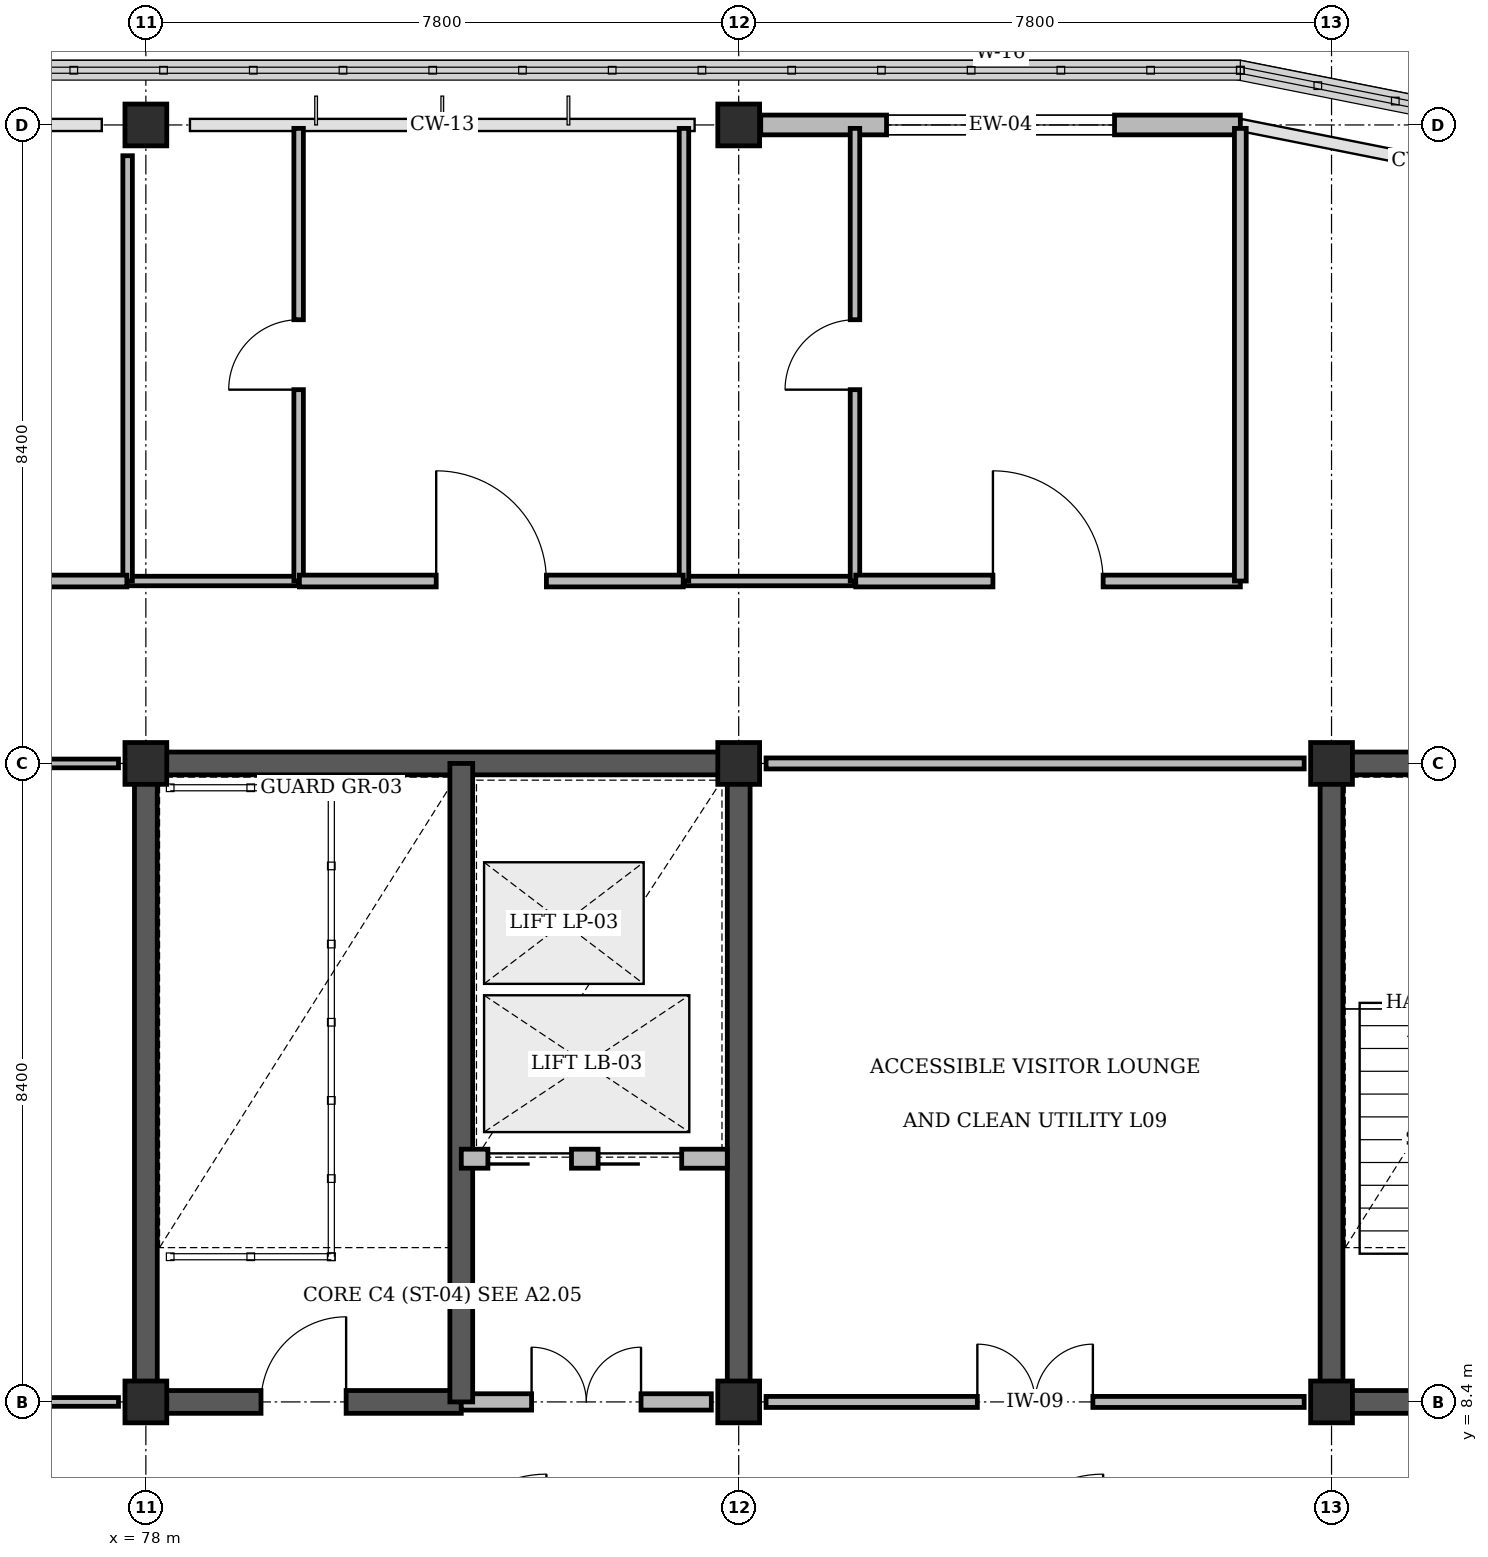
"""IFC4 building model, lengths in metres.
Left out: names, types, materials, properties, quantities, classifications, styles, units other than length and angle.
Written with IfcOpenShell. Run it as: python <this file> out.ifc"""

import sys

from ifc_helpers import new_model, si_unit, direction, frame, frame_2d, origin, origin_2d, place, context, subcontext, project, spatial, rectangle, extrude, element, fill, save


model = new_model("IFC4")
c1 = context("Model", 3, precision=1e-05, world=origin(), true_north=direction((0.0, 1.0)))
c2 = subcontext(c1, "Body", "Model", "MODEL_VIEW")
j1 = project(units=[si_unit("LENGTHUNIT", "METRE"), si_unit("PLANEANGLEUNIT", "RADIAN")], contexts=[c1])
p1 = place(None, origin())
s1 = spatial("IfcSite", under=j1, at=p1, CompositionType="ELEMENT")
p2 = place(p1, origin())
s2 = spatial("IfcBuilding", under=s1, at=p2, CompositionType="ELEMENT")
p3 = place(p2, frame((0.0, 0.0, 39.0)))
s3 = spatial("IfcBuildingStorey", under=s2, at=p3, CompositionType="ELEMENT", Elevation=39.0)
p4 = place(p3, frame((77.85, 16.8, 0.0), z_axis=(0.0, 0.0, 1.0), x_axis=(1.0, 0.0, 0.0)))
e1 = element("IfcWall", 1, at=p4, inside=s3, PredefinedType="SHEAR", context=c2, shape_type="SweptSolid", body=[
    extrude(rectangle(XDim=8.1, YDim=0.3, at=frame_2d((4.05, 0.0))), origin(), (0.0, 0.0, 1.0), 4.2),
])
for number, where, z_axis, x_axis in (
    (2, (78.0, 8.4, 0.0), (0.0, 0.0, 1.0), (0.0, 1.0, 0.0)),
    (3, (85.8, 8.4, 0.0), (0.0, 0.0, 1.0), (0.0, 1.0, 0.0)),
):
    element("IfcWall", number, at=place(p3, frame(where, z_axis=z_axis, x_axis=x_axis)), inside=s3, PredefinedType="SHEAR", context=c2, shape_type="SweptSolid", body=[
        extrude(rectangle(XDim=8.4, YDim=0.3, at=frame_2d((4.2, 0.0))), origin(), (0.0, 0.0, 1.0), 4.2),
    ])
p5 = place(p3, frame((93.45, 16.8, 0.0), z_axis=(0.0, 0.0, 1.0), x_axis=(1.0, 0.0, 0.0)))
e4 = element("IfcWall", 4, at=p5, inside=s3, PredefinedType="SHEAR", context=c2, shape_type="SweptSolid", body=[
    extrude(rectangle(XDim=8.1, YDim=0.3, at=frame_2d((4.05, 0.0))), origin(), (0.0, 0.0, 1.0), 3.92),
])
p6 = place(p3, frame((93.6, 8.4, 0.0), z_axis=(0.0, 0.0, 1.0), x_axis=(0.0, 1.0, 0.0)))
e5 = element("IfcWall", 5, at=p6, inside=s3, PredefinedType="SHEAR", context=c2, shape_type="SweptSolid", body=[
    extrude(rectangle(XDim=8.4, YDim=0.3, at=frame_2d((4.2, 0.0))), origin(), (0.0, 0.0, 1.0), 3.92),
])
for number, where, z_axis, x_axis in (
    (6, (78.0, 8.4, 0.0), (0.0, 0.0, 1.0), (1.0, 0.0, 0.0)),
    (7, (78.0, 16.8, 0.0), (0.0, 0.0, 1.0), (1.0, 0.0, 0.0)),
    (8, (78.0, 25.2, 0.0), (0.0, 0.0, 1.0), (1.0, 0.0, 0.0)),
    (9, (85.8, 8.4, 0.0), (0.0, 0.0, 1.0), (1.0, 0.0, 0.0)),
    (10, (85.8, 16.8, 0.0), (0.0, 0.0, 1.0), (1.0, 0.0, 0.0)),
    (11, (85.8, 25.2, 0.0), (0.0, 0.0, 1.0), (1.0, 0.0, 0.0)),
    (12, (93.6, 8.4, 0.0), (0.0, 0.0, 1.0), (1.0, 0.0, 0.0)),
    (13, (93.6, 16.8, 0.0), (0.0, 0.0, 1.0), (1.0, 0.0, 0.0)),
):
    element("IfcColumn", number, at=place(p3, frame(where, z_axis=z_axis, x_axis=x_axis)), inside=s3, PredefinedType="COLUMN", context=c2, shape_type="SweptSolid", body=[
        extrude(rectangle(XDim=0.55, YDim=0.55, at=origin_2d()), origin(), (0.0, 0.0, 1.0), 4.2),
    ])
p7 = place(p3, frame((86.09, 25.2, 0.0), z_axis=(0.0, 0.0, 1.0), x_axis=(1.0, 0.0, 0.0)))
e14 = element("IfcWall", 14, at=p7, inside=s3, PredefinedType="STANDARD", context=c2, shape_type="SweptSolid", body=[
    extrude(rectangle(XDim=6.31, YDim=0.26, at=frame_2d((3.155, 0.0))), origin(), (0.0, 0.0, 1.0), 3.9),
])
p8 = place(p7, frame((1.655, 0.0, 0.85)))
e15 = element("IfcOpeningElement", 15, at=p8, cuts=e14, PredefinedType="OPENING", context=c2, shape_type="SweptSolid", body=[
    extrude(rectangle(XDim=3.0, YDim=1.8, at=frame_2d((1.5, 0.9))), frame((0.0, 0.14, 0.0), z_axis=(0.0, -1.0, 0.0), x_axis=(1.0, 0.0, 0.0)), (0.0, 0.0, 1.0), 0.28),
])
p9 = place(p3, frame((78.0, 8.4, 0.0), z_axis=(0.0, 0.0, 1.0), x_axis=(1.0, 0.0, 0.0)))
e16 = element("IfcWall", 16, at=p9, inside=s3, PredefinedType="SHEAR", context=c2, shape_type="SweptSolid", body=[
    extrude(rectangle(XDim=4.15, YDim=0.3, at=frame_2d((2.075, 0.0))), origin(), (0.0, 0.0, 1.0), 4.2),
])
p10 = place(p9, frame((1.515, 0.0, 0.0)))
e17 = element("IfcOpeningElement", 17, at=p10, cuts=e16, PredefinedType="OPENING", context=c2, shape_type="SweptSolid", body=[
    extrude(rectangle(XDim=1.12, YDim=2.15, at=frame_2d((0.56, 1.075))), frame((0.0, 0.16, 0.0), z_axis=(0.0, -1.0, 0.0), x_axis=(1.0, 0.0, 0.0)), (0.0, 0.0, 1.0), 0.32),
])
p11 = place(p3, frame((82.15, 8.4, 0.0), z_axis=(0.0, 0.0, 1.0), x_axis=(1.0, 0.0, 0.0)))
e18 = element("IfcWall", 18, at=p11, inside=s3, PredefinedType="STANDARD", context=c2, shape_type="SweptSolid", body=[
    extrude(rectangle(XDim=3.29, YDim=0.215, at=frame_2d((1.645, 0.0))), origin(), (0.0, 0.0, 1.0), 3.37),
])
p12 = place(p11, frame((0.925, 0.0, 0.0)))
e19 = element("IfcOpeningElement", 19, at=p12, cuts=e18, PredefinedType="OPENING", context=c2, shape_type="SweptSolid", body=[
    extrude(rectangle(XDim=1.44, YDim=2.2, at=frame_2d((0.72, 1.1))), frame((0.0, 0.118, 0.0), z_axis=(0.0, -1.0, 0.0), x_axis=(1.0, 0.0, 0.0)), (0.0, 0.0, 1.0), 0.235),
])
p13 = place(p3, frame((82.15, 8.4, 0.0), z_axis=(0.0, 0.0, 1.0), x_axis=(0.0, 1.0, 0.0)))
e20 = element("IfcWall", 20, at=p13, inside=s3, PredefinedType="SHEAR", context=c2, shape_type="SweptSolid", body=[
    extrude(rectangle(XDim=8.4, YDim=0.3, at=frame_2d((4.2, 0.0))), origin(), (0.0, 0.0, 1.0), 4.2),
])
p14 = place(p3, frame((82.15, 11.6, 0.0), z_axis=(0.0, 0.0, 1.0), x_axis=(1.0, 0.0, 0.0)))
e21 = element("IfcWall", 21, at=p14, inside=s3, PredefinedType="STANDARD", context=c2, shape_type="SweptSolid", body=[
    extrude(rectangle(XDim=3.5, YDim=0.25, at=frame_2d((1.75, 0.0))), origin(), (0.0, 0.0, 1.0), 3.9),
])
p15 = place(p14, frame((0.35, 0.0, 0.0)))
e22 = element("IfcOpeningElement", 22, at=p15, cuts=e21, PredefinedType="OPENING", context=c2, shape_type="SweptSolid", body=[
    extrude(rectangle(XDim=1.1, YDim=2.2, at=frame_2d((0.55, 1.1))), frame((0.0, 0.135, 0.0), z_axis=(0.0, -1.0, 0.0), x_axis=(1.0, 0.0, 0.0)), (0.0, 0.0, 1.0), 0.27),
])
p16 = place(p14, frame((1.8, 0.0, 0.0)))
e23 = element("IfcOpeningElement", 23, at=p16, cuts=e21, PredefinedType="OPENING", context=c2, shape_type="SweptSolid", body=[
    extrude(rectangle(XDim=1.1, YDim=2.2, at=frame_2d((0.55, 1.1))), frame((0.0, 0.135, 0.0), z_axis=(0.0, -1.0, 0.0), x_axis=(1.0, 0.0, 0.0)), (0.0, 0.0, 1.0), 0.27),
])
p17 = place(p3, frame((93.6, 8.4, 0.0), z_axis=(0.0, 0.0, 1.0), x_axis=(1.0, 0.0, 0.0)))
e24 = element("IfcWall", 24, at=p17, inside=s3, PredefinedType="SHEAR", context=c2, shape_type="SweptSolid", body=[
    extrude(rectangle(XDim=4.15, YDim=0.3, at=frame_2d((2.075, 0.0))), origin(), (0.0, 0.0, 1.0), 4.2),
])
p18 = place(p17, frame((1.515, 0.0, 0.0)))
e25 = element("IfcOpeningElement", 25, at=p18, cuts=e24, PredefinedType="OPENING", context=c2, shape_type="SweptSolid", body=[
    extrude(rectangle(XDim=1.12, YDim=2.15, at=frame_2d((0.56, 1.075))), frame((0.0, 0.16, 0.0), z_axis=(0.0, -1.0, 0.0), x_axis=(1.0, 0.0, 0.0)), (0.0, 0.0, 1.0), 0.32),
])
p19 = place(p3, frame((77.76, 19.2, 0.0), z_axis=(0.0, 0.0, 1.0), x_axis=(1.0, 0.0, 0.0)))
e26 = element("IfcWall", 26, at=p19, inside=s3, PredefinedType="PARTITIONING", context=c2, shape_type="SweptSolid", body=[
    extrude(rectangle(XDim=2.25, YDim=0.125, at=frame_2d((1.125, 0.0))), origin(), (0.0, 0.0, 1.0), 3.9),
])
p20 = place(p3, frame((77.76, 19.2, 0.0), z_axis=(0.0, 0.0, 1.0), x_axis=(0.0, 1.0, 0.0)))
e27 = element("IfcWall", 27, at=p20, inside=s3, PredefinedType="PARTITIONING", context=c2, shape_type="SweptSolid", body=[
    extrude(rectangle(XDim=5.595, YDim=0.125, at=frame_2d((2.797, 0.0))), origin(), (0.0, 0.0, 1.0), 3.355),
])
p21 = place(p3, frame((80.01, 19.2, 0.0), z_axis=(0.0, 0.0, 1.0), x_axis=(0.0, 1.0, 0.0)))
e28 = element("IfcWall", 28, at=p21, inside=s3, PredefinedType="PARTITIONING", context=c2, shape_type="SweptSolid", body=[
    extrude(rectangle(XDim=5.955, YDim=0.125, at=frame_2d((2.978, 0.0))), origin(), (0.0, 0.0, 1.0), 3.9),
])
p22 = place(p21, frame((2.518, 0.0, 0.0)))
e29 = element("IfcOpeningElement", 29, at=p22, cuts=e28, PredefinedType="OPENING", context=c2, shape_type="SweptSolid", body=[
    extrude(rectangle(XDim=0.92, YDim=2.1, at=frame_2d((0.46, 1.05))), frame((0.0, 0.073, 0.0), z_axis=(0.0, -1.0, 0.0), x_axis=(1.0, 0.0, 0.0)), (0.0, 0.0, 1.0), 0.145),
])
p23 = place(p3, frame((85.08, 19.2, 0.0), z_axis=(0.0, 0.0, 1.0), x_axis=(1.0, 0.0, 0.0)))
e30 = element("IfcWall", 30, at=p23, inside=s3, PredefinedType="PARTITIONING", context=c2, shape_type="SweptSolid", body=[
    extrude(rectangle(XDim=2.25, YDim=0.125, at=frame_2d((1.125, 0.0))), origin(), (0.0, 0.0, 1.0), 3.9),
])
p24 = place(p3, frame((85.08, 19.2, 0.0), z_axis=(0.0, 0.0, 1.0), x_axis=(0.0, 1.0, 0.0)))
e31 = element("IfcWall", 31, at=p24, inside=s3, PredefinedType="PARTITIONING", context=c2, shape_type="SweptSolid", body=[
    extrude(rectangle(XDim=5.955, YDim=0.125, at=frame_2d((2.978, 0.0))), origin(), (0.0, 0.0, 1.0), 3.9),
])
p25 = place(p3, frame((87.33, 19.2, 0.0), z_axis=(0.0, 0.0, 1.0), x_axis=(0.0, 1.0, 0.0)))
e32 = element("IfcWall", 32, at=p25, inside=s3, PredefinedType="PARTITIONING", context=c2, shape_type="SweptSolid", body=[
    extrude(rectangle(XDim=5.955, YDim=0.125, at=frame_2d((2.978, 0.0))), origin(), (0.0, 0.0, 1.0), 3.9),
])
p26 = place(p25, frame((2.518, 0.0, 0.0)))
e33 = element("IfcOpeningElement", 33, at=p26, cuts=e32, PredefinedType="OPENING", context=c2, shape_type="SweptSolid", body=[
    extrude(rectangle(XDim=0.92, YDim=2.1, at=frame_2d((0.46, 1.05))), frame((0.0, 0.073, 0.0), z_axis=(0.0, -1.0, 0.0), x_axis=(1.0, 0.0, 0.0)), (0.0, 0.0, 1.0), 0.145),
])
p27 = place(p3, frame((72.7, 19.2, 0.0), z_axis=(0.0, 0.0, 1.0), x_axis=(1.0, 0.0, 0.0)))
e34 = element("IfcWall", 34, at=p27, inside=s3, PredefinedType="PARTITIONING", context=c2, shape_type="SweptSolid", body=[
    extrude(rectangle(XDim=5.05, YDim=0.155, at=frame_2d((2.525, 0.0))), origin(), (0.0, 0.0, 1.0), 3.9),
])
p28 = place(p27, frame((1.8, 0.0, 0.0)))
e35 = element("IfcOpeningElement", 35, at=p28, cuts=e34, PredefinedType="OPENING", context=c2, shape_type="SweptSolid", body=[
    extrude(rectangle(XDim=1.45, YDim=2.2, at=frame_2d((0.725, 1.1))), frame((0.0, 0.087, 0.0), z_axis=(0.0, -1.0, 0.0), x_axis=(1.0, 0.0, 0.0)), (0.0, 0.0, 1.0), 0.175),
])
p29 = place(p3, frame((80.02, 19.2, 0.0), z_axis=(0.0, 0.0, 1.0), x_axis=(1.0, 0.0, 0.0)))
e36 = element("IfcWall", 36, at=p29, inside=s3, PredefinedType="PARTITIONING", context=c2, shape_type="SweptSolid", body=[
    extrude(rectangle(XDim=5.05, YDim=0.155, at=frame_2d((2.525, 0.0))), origin(), (0.0, 0.0, 1.0), 3.9),
])
p30 = place(p29, frame((1.8, 0.0, 0.0)))
e37 = element("IfcOpeningElement", 37, at=p30, cuts=e36, PredefinedType="OPENING", context=c2, shape_type="SweptSolid", body=[
    extrude(rectangle(XDim=1.45, YDim=2.2, at=frame_2d((0.725, 1.1))), frame((0.0, 0.087, 0.0), z_axis=(0.0, -1.0, 0.0), x_axis=(1.0, 0.0, 0.0)), (0.0, 0.0, 1.0), 0.175),
])
p31 = place(p3, frame((87.34, 19.2, 0.0), z_axis=(0.0, 0.0, 1.0), x_axis=(1.0, 0.0, 0.0)))
e38 = element("IfcWall", 38, at=p31, inside=s3, PredefinedType="PARTITIONING", context=c2, shape_type="SweptSolid", body=[
    extrude(rectangle(XDim=5.06, YDim=0.155, at=frame_2d((2.53, 0.0))), origin(), (0.0, 0.0, 1.0), 3.9),
])
p32 = place(p31, frame((1.805, 0.0, 0.0)))
e39 = element("IfcOpeningElement", 39, at=p32, cuts=e38, PredefinedType="OPENING", context=c2, shape_type="SweptSolid", body=[
    extrude(rectangle(XDim=1.45, YDim=2.2, at=frame_2d((0.725, 1.1))), frame((0.0, 0.087, 0.0), z_axis=(0.0, -1.0, 0.0), x_axis=(1.0, 0.0, 0.0)), (0.0, 0.0, 1.0), 0.175),
])
p33 = place(p3, frame((92.4, 19.2, 0.0), z_axis=(0.0, 0.0, 1.0), x_axis=(0.0, 1.0, 0.0)))
e40 = element("IfcWall", 40, at=p33, inside=s3, PredefinedType="PARTITIONING", context=c2, shape_type="SweptSolid", body=[
    extrude(rectangle(XDim=5.955, YDim=0.155, at=frame_2d((2.978, 0.0))), origin(), (0.0, 0.0, 1.0), 3.9),
])
for number, where, z_axis, x_axis in (
    (41, (73.2, 8.4, 0.0), (0.0, 0.0, 1.0), (1.0, 0.0, 0.0)),
    (42, (73.2, 16.8, 0.0), (0.0, 0.0, 1.0), (1.0, 0.0, 0.0)),
):
    element("IfcWall", number, at=place(p3, frame(where, z_axis=z_axis, x_axis=x_axis)), inside=s3, PredefinedType="PARTITIONING", context=c2, shape_type="SweptSolid", body=[
        extrude(rectangle(XDim=4.44, YDim=0.115, at=frame_2d((2.22, 0.0))), origin(), (0.0, 0.0, 1.0), 3.37),
    ])
p34 = place(p3, frame((86.16, 8.4, 0.0), z_axis=(0.0, 0.0, 1.0), x_axis=(1.0, 0.0, 0.0)))
e43 = element("IfcWall", 43, at=p34, inside=s3, PredefinedType="PARTITIONING", context=c2, shape_type="SweptSolid", body=[
    extrude(rectangle(XDim=7.08, YDim=0.145, at=frame_2d((3.54, 0.0))), origin(), (0.0, 0.0, 1.0), 3.37),
])
p35 = place(p34, frame((2.78, 0.0, 0.0)))
e44 = element("IfcOpeningElement", 44, at=p35, cuts=e43, PredefinedType="OPENING", context=c2, shape_type="SweptSolid", body=[
    extrude(rectangle(XDim=1.52, YDim=2.2, at=frame_2d((0.76, 1.1))), frame((0.0, 0.083, 0.0), z_axis=(0.0, -1.0, 0.0), x_axis=(1.0, 0.0, 0.0)), (0.0, 0.0, 1.0), 0.165),
])
p36 = place(p3, frame((86.16, 16.8, 0.0), z_axis=(0.0, 0.0, 1.0), x_axis=(1.0, 0.0, 0.0)))
e45 = element("IfcWall", 45, at=p36, inside=s3, PredefinedType="PARTITIONING", context=c2, shape_type="SweptSolid", body=[
    extrude(rectangle(XDim=7.08, YDim=0.145, at=frame_2d((3.54, 0.0))), origin(), (0.0, 0.0, 1.0), 3.37),
])
p37 = place(p8, origin())
e46 = element("IfcWindow", 46, at=p37, inside=s3, PartitioningType="SINGLE_PANEL", PredefinedType="WINDOW", context=c2, shape_type="SweptSolid", body=[
    extrude(rectangle(XDim=3.0, YDim=1.8, at=frame_2d((1.5, 0.9))), frame((0.0, 0.03, 0.0), z_axis=(0.0, -1.0, 0.0), x_axis=(1.0, 0.0, 0.0)), (0.0, 0.0, 1.0), 0.06),
])
fill(e15, e46)
p38 = place(p10, origin())
e47 = element("IfcDoor", 47, at=p38, inside=s3, OperationType="SINGLE_SWING_RIGHT", PredefinedType="DOOR", context=c2, shape_type="SweptSolid", body=[
    extrude(rectangle(XDim=1.12, YDim=2.15, at=frame_2d((0.56, 1.075))), frame((0.0, 0.025, 0.0), z_axis=(0.0, -1.0, 0.0), x_axis=(1.0, 0.0, 0.0)), (0.0, 0.0, 1.0), 0.05),
])
fill(e17, e47)
p39 = place(p12, origin())
e48 = element("IfcDoor", 48, at=p39, inside=s3, OperationType="DOUBLE_DOOR_SINGLE_SWING", PredefinedType="DOOR", context=c2, shape_type="SweptSolid", body=[
    extrude(rectangle(XDim=1.44, YDim=2.2, at=frame_2d((0.72, 1.1))), frame((0.0, 0.025, 0.0), z_axis=(0.0, -1.0, 0.0), x_axis=(1.0, 0.0, 0.0)), (0.0, 0.0, 1.0), 0.05),
])
fill(e19, e48)
p40 = place(p15, origin())
e49 = element("IfcDoor", 49, at=p40, inside=s3, OperationType="SLIDING_TO_LEFT", PredefinedType="DOOR", context=c2, shape_type="SweptSolid", body=[
    extrude(rectangle(XDim=1.1, YDim=2.2, at=frame_2d((0.55, 1.1))), frame((0.0, 0.025, 0.0), z_axis=(0.0, -1.0, 0.0), x_axis=(1.0, 0.0, 0.0)), (0.0, 0.0, 1.0), 0.05),
])
fill(e22, e49)
p41 = place(p16, origin())
e50 = element("IfcDoor", 50, at=p41, inside=s3, OperationType="SLIDING_TO_LEFT", PredefinedType="DOOR", context=c2, shape_type="SweptSolid", body=[
    extrude(rectangle(XDim=1.1, YDim=2.2, at=frame_2d((0.55, 1.1))), frame((0.0, 0.025, 0.0), z_axis=(0.0, -1.0, 0.0), x_axis=(1.0, 0.0, 0.0)), (0.0, 0.0, 1.0), 0.05),
])
fill(e23, e50)
p42 = place(p22, origin())
e51 = element("IfcDoor", 51, at=p42, inside=s3, OperationType="SINGLE_SWING_LEFT", PredefinedType="DOOR", context=c2, shape_type="SweptSolid", body=[
    extrude(rectangle(XDim=0.92, YDim=2.1, at=frame_2d((0.46, 1.05))), frame((0.0, 0.025, 0.0), z_axis=(0.0, -1.0, 0.0), x_axis=(1.0, 0.0, 0.0)), (0.0, 0.0, 1.0), 0.05),
])
fill(e29, e51)
p43 = place(p26, origin())
e52 = element("IfcDoor", 52, at=p43, inside=s3, OperationType="SINGLE_SWING_LEFT", PredefinedType="DOOR", context=c2, shape_type="SweptSolid", body=[
    extrude(rectangle(XDim=0.92, YDim=2.1, at=frame_2d((0.46, 1.05))), frame((0.0, 0.025, 0.0), z_axis=(0.0, -1.0, 0.0), x_axis=(1.0, 0.0, 0.0)), (0.0, 0.0, 1.0), 0.05),
])
fill(e33, e52)
p44 = place(p30, origin())
e53 = element("IfcDoor", 53, at=p44, inside=s3, OperationType="SINGLE_SWING_LEFT", PredefinedType="DOOR", context=c2, shape_type="SweptSolid", body=[
    extrude(rectangle(XDim=1.45, YDim=2.2, at=frame_2d((0.725, 1.1))), frame((0.0, 0.025, 0.0), z_axis=(0.0, -1.0, 0.0), x_axis=(1.0, 0.0, 0.0)), (0.0, 0.0, 1.0), 0.05),
])
fill(e37, e53)
p45 = place(p32, origin())
e54 = element("IfcDoor", 54, at=p45, inside=s3, OperationType="SINGLE_SWING_LEFT", PredefinedType="DOOR", context=c2, shape_type="SweptSolid", body=[
    extrude(rectangle(XDim=1.45, YDim=2.2, at=frame_2d((0.725, 1.1))), frame((0.0, 0.025, 0.0), z_axis=(0.0, -1.0, 0.0), x_axis=(1.0, 0.0, 0.0)), (0.0, 0.0, 1.0), 0.05),
])
fill(e39, e54)
p46 = place(p35, origin())
e55 = element("IfcDoor", 55, at=p46, inside=s3, OperationType="DOUBLE_DOOR_SINGLE_SWING", PredefinedType="DOOR", context=c2, shape_type="SweptSolid", body=[
    extrude(rectangle(XDim=1.52, YDim=2.2, at=frame_2d((0.76, 1.1))), frame((0.0, 0.025, 0.0), z_axis=(0.0, -1.0, 0.0), x_axis=(1.0, 0.0, 0.0)), (0.0, 0.0, 1.0), 0.05),
])
fill(e44, e55)
save(model, sys.argv[1])
